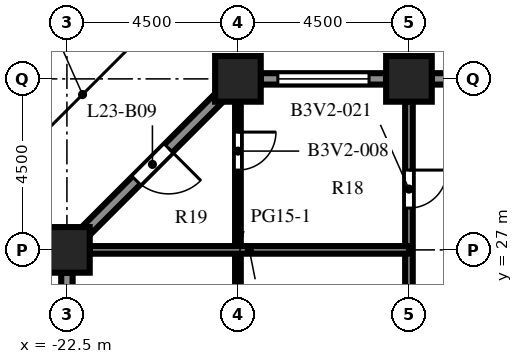
"""IFC4 building model, lengths in metres.
Left out: names, types, materials, properties, quantities, classifications, styles, units other than length and angle.
Written with IfcOpenShell. Run it as: python <this file> out.ifc"""

import sys

from ifc_helpers import new_model, si_unit, direction, frame, frame_2d, origin, origin_2d, place, context, subcontext, project, spatial, rectangle, extrude, element, fill, save


model = new_model("IFC4")
c1 = context("Model", 3, precision=1e-05, world=origin(), true_north=direction((0.0, 1.0)))
c2 = subcontext(c1, "Body", "Model", "MODEL_VIEW")
j1 = project(units=[si_unit("LENGTHUNIT", "METRE"), si_unit("PLANEANGLEUNIT", "RADIAN")], contexts=[c1])
p1 = place(None, origin())
s1 = spatial("IfcSite", under=j1, at=p1, CompositionType="ELEMENT")
p2 = place(p1, origin())
s2 = spatial("IfcBuilding", under=s1, at=p2, CompositionType="ELEMENT")
p3 = place(p2, frame((0.0, 0.0, 102.5)))
s3 = spatial("IfcBuildingStorey", under=s2, at=p3, CompositionType="ELEMENT", Elevation=102.5)
for number, where, z_axis, x_axis in (
    (1, (-22.5, 27.0, 0.0), (0.0, 0.0, 1.0), (1.0, 0.0, 0.0)),
    (2, (-18.0, 31.5, 0.0), (0.0, 0.0, 1.0), (1.0, 0.0, 0.0)),
    (3, (-13.5, 31.5, 0.0), (0.0, 0.0, 1.0), (1.0, 0.0, 0.0)),
):
    element("IfcColumn", number, at=place(p3, frame(where, z_axis=z_axis, x_axis=x_axis)), inside=s3, PredefinedType="COLUMN", context=c2, shape_type="SweptSolid", body=[
        extrude(rectangle(XDim=1.2, YDim=1.2, at=origin_2d()), origin(), (0.0, 0.0, 1.0), 4.1),
    ])
p4 = place(p3, frame((-12.9, 31.5, 0.0), z_axis=(0.0, 0.0, 1.0), x_axis=(1.0, 0.0, 0.0)))
e4 = element("IfcWall", 4, at=p4, inside=s3, PredefinedType="SOLIDWALL", context=c2, shape_type="SweptSolid", body=[
    extrude(rectangle(XDim=3.3, YDim=0.3, at=frame_2d((1.65, 0.0))), origin(), (0.0, 0.0, 1.0), 2.75),
])
p5 = place(p4, frame((1.15, 0.0, 0.0)))
e5 = element("IfcOpeningElement", 5, at=p5, cuts=e4, PredefinedType="OPENING", context=c2, shape_type="SweptSolid", body=[
    extrude(rectangle(XDim=1.0, YDim=2.2, at=frame_2d((0.5, 1.1))), frame((0.0, 0.16, 0.0), z_axis=(0.0, -1.0, 0.0), x_axis=(1.0, 0.0, 0.0)), (0.0, 0.0, 1.0), 0.32),
])
p6 = place(p3, frame((-17.4, 31.5, 0.0), z_axis=(0.0, 0.0, 1.0), x_axis=(1.0, 0.0, 0.0)))
e6 = element("IfcWall", 6, at=p6, inside=s3, PredefinedType="SOLIDWALL", context=c2, shape_type="SweptSolid", body=[
    extrude(rectangle(XDim=3.3, YDim=0.3, at=frame_2d((1.65, 0.0))), origin(), (0.0, 0.0, 1.0), 2.75),
])
p7 = place(p6, frame((0.45, 0.0, 0.8)))
e7 = element("IfcOpeningElement", 7, at=p7, cuts=e6, PredefinedType="OPENING", context=c2, shape_type="SweptSolid", body=[
    extrude(rectangle(XDim=2.4, YDim=1.7, at=frame_2d((1.2, 0.85))), frame((0.0, 0.16, 0.0), z_axis=(0.0, -1.0, 0.0), x_axis=(1.0, 0.0, 0.0)), (0.0, 0.0, 1.0), 0.32),
])
p8 = place(p3, frame((-22.006, 27.494, 0.0), z_axis=(0.0, 0.0, 1.0), x_axis=(0.707106781187, 0.707106781187, 0.0)))
e8 = element("IfcWall", 8, at=p8, inside=s3, PredefinedType="SOLIDWALL", context=c2, shape_type="SweptSolid", body=[
    extrude(rectangle(XDim=4.967, YDim=0.3, at=frame_2d((2.483, 0.0))), origin(), (0.0, 0.0, 1.0), 2.75),
])
p9 = place(p8, frame((1.884, 0.0, 0.0)))
e9 = element("IfcOpeningElement", 9, at=p9, cuts=e8, PredefinedType="OPENING", context=c2, shape_type="SweptSolid", body=[
    extrude(rectangle(XDim=1.2, YDim=2.2, at=frame_2d((0.6, 1.1))), frame((0.0, 0.16, 0.0), z_axis=(0.0, -1.0, 0.0), x_axis=(1.0, 0.0, 0.0)), (0.0, 0.0, 1.0), 0.32),
])
p10 = place(p3, frame((-22.5, 23.1, 0.0), z_axis=(0.0, 0.0, 1.0), x_axis=(0.0, 1.0, 0.0)))
e10 = element("IfcWall", 10, at=p10, inside=s3, PredefinedType="SOLIDWALL", context=c2, shape_type="SweptSolid", body=[
    extrude(rectangle(XDim=3.3, YDim=0.3, at=frame_2d((1.65, 0.0))), origin(), (0.0, 0.0, 1.0), 2.75),
])
p11 = place(p10, frame((0.45, 0.0, 0.8)))
e11 = element("IfcOpeningElement", 11, at=p11, cuts=e10, PredefinedType="OPENING", context=c2, shape_type="SweptSolid", body=[
    extrude(rectangle(XDim=2.4, YDim=1.7, at=frame_2d((1.2, 0.85))), frame((0.0, 0.16, 0.0), z_axis=(0.0, -1.0, 0.0), x_axis=(1.0, 0.0, 0.0)), (0.0, 0.0, 1.0), 0.32),
])
p12 = place(p3, frame((-18.0, 23.2, 0.0), z_axis=(0.0, 0.0, 1.0), x_axis=(0.0, 1.0, 0.0)))
e12 = element("IfcWall", 12, at=p12, inside=s3, PredefinedType="PARTITIONING", context=c2, shape_type="SweptSolid", body=[
    extrude(rectangle(XDim=7.7, YDim=0.15, at=frame_2d((3.85, 0.0))), origin(), (0.0, 0.0, 1.0), 3.65),
])
p13 = place(p12, frame((0.15, 0.0, 0.0)))
e13 = element("IfcOpeningElement", 13, at=p13, cuts=e12, PredefinedType="OPENING", context=c2, shape_type="SweptSolid", body=[
    extrude(rectangle(XDim=1.0, YDim=2.1, at=frame_2d((0.5, 1.05))), frame((0.0, 0.085, 0.0), z_axis=(0.0, -1.0, 0.0), x_axis=(1.0, 0.0, 0.0)), (0.0, 0.0, 1.0), 0.17),
])
p14 = place(p12, frame((5.9, 0.0, 0.0)))
e14 = element("IfcOpeningElement", 14, at=p14, cuts=e12, PredefinedType="OPENING", context=c2, shape_type="SweptSolid", body=[
    extrude(rectangle(XDim=1.0, YDim=2.1, at=frame_2d((0.5, 1.05))), frame((0.0, 0.085, 0.0), z_axis=(0.0, -1.0, 0.0), x_axis=(1.0, 0.0, 0.0)), (0.0, 0.0, 1.0), 0.17),
])
p15 = place(p3, frame((-13.5, -21.9, 0.0), z_axis=(0.0, 0.0, 1.0), x_axis=(0.0, 1.0, 0.0)))
e15 = element("IfcWall", 15, at=p15, inside=s3, PredefinedType="PARTITIONING", context=c2, shape_type="SweptSolid", body=[
    extrude(rectangle(XDim=52.8, YDim=0.2, at=frame_2d((26.4, 0.0))), origin(), (0.0, 0.0, 1.0), 3.65),
])
p16 = place(p15, frame((0.75, 0.0, 0.0)))
e16 = element("IfcOpeningElement", 16, at=p16, cuts=e15, PredefinedType="OPENING", context=c2, shape_type="SweptSolid", body=[
    extrude(rectangle(XDim=1.0, YDim=2.1, at=frame_2d((0.5, 1.05))), frame((0.0, 0.11, 0.0), z_axis=(0.0, -1.0, 0.0), x_axis=(1.0, 0.0, 0.0)), (0.0, 0.0, 1.0), 0.22),
])
p17 = place(p15, frame((5.0, 0.0, 0.0)))
e17 = element("IfcOpeningElement", 17, at=p17, cuts=e15, PredefinedType="OPENING", context=c2, shape_type="SweptSolid", body=[
    extrude(rectangle(XDim=1.0, YDim=2.1, at=frame_2d((0.5, 1.05))), frame((0.0, 0.11, 0.0), z_axis=(0.0, -1.0, 0.0), x_axis=(1.0, 0.0, 0.0)), (0.0, 0.0, 1.0), 0.22),
])
p18 = place(p15, frame((12.5, 0.0, 0.0)))
e18 = element("IfcOpeningElement", 18, at=p18, cuts=e15, PredefinedType="OPENING", context=c2, shape_type="SweptSolid", body=[
    extrude(rectangle(XDim=1.0, YDim=2.1, at=frame_2d((0.5, 1.05))), frame((0.0, 0.11, 0.0), z_axis=(0.0, -1.0, 0.0), x_axis=(1.0, 0.0, 0.0)), (0.0, 0.0, 1.0), 0.22),
])
p19 = place(p15, frame((19.75, 0.0, 0.0)))
e19 = element("IfcOpeningElement", 19, at=p19, cuts=e15, PredefinedType="OPENING", context=c2, shape_type="SweptSolid", body=[
    extrude(rectangle(XDim=1.0, YDim=2.1, at=frame_2d((0.5, 1.05))), frame((0.0, 0.11, 0.0), z_axis=(0.0, -1.0, 0.0), x_axis=(1.0, 0.0, 0.0)), (0.0, 0.0, 1.0), 0.22),
])
p20 = place(p15, frame((26.0, 0.0, 0.0)))
e20 = element("IfcOpeningElement", 20, at=p20, cuts=e15, PredefinedType="OPENING", context=c2, shape_type="SweptSolid", body=[
    extrude(rectangle(XDim=1.0, YDim=2.1, at=frame_2d((0.5, 1.05))), frame((0.0, 0.11, 0.0), z_axis=(0.0, -1.0, 0.0), x_axis=(1.0, 0.0, 0.0)), (0.0, 0.0, 1.0), 0.22),
])
p21 = place(p15, frame((37.5, 0.0, 0.0)))
e21 = element("IfcOpeningElement", 21, at=p21, cuts=e15, PredefinedType="OPENING", context=c2, shape_type="SweptSolid", body=[
    extrude(rectangle(XDim=1.0, YDim=2.1, at=frame_2d((0.5, 1.05))), frame((0.0, 0.11, 0.0), z_axis=(0.0, -1.0, 0.0), x_axis=(1.0, 0.0, 0.0)), (0.0, 0.0, 1.0), 0.22),
])
p22 = place(p15, frame((43.25, 0.0, 0.0)))
e22 = element("IfcOpeningElement", 22, at=p22, cuts=e15, PredefinedType="OPENING", context=c2, shape_type="SweptSolid", body=[
    extrude(rectangle(XDim=1.0, YDim=2.1, at=frame_2d((0.5, 1.05))), frame((0.0, 0.11, 0.0), z_axis=(0.0, -1.0, 0.0), x_axis=(1.0, 0.0, 0.0)), (0.0, 0.0, 1.0), 0.22),
])
p23 = place(p15, frame((50.0, 0.0, 0.0)))
e23 = element("IfcOpeningElement", 23, at=p23, cuts=e15, PredefinedType="OPENING", context=c2, shape_type="SweptSolid", body=[
    extrude(rectangle(XDim=1.0, YDim=2.1, at=frame_2d((0.5, 1.05))), frame((0.0, 0.11, 0.0), z_axis=(0.0, -1.0, 0.0), x_axis=(1.0, 0.0, 0.0)), (0.0, 0.0, 1.0), 0.22),
])
p24 = place(p3, frame((-21.9, 27.0, 0.0), z_axis=(0.0, 0.0, 1.0), x_axis=(1.0, 0.0, 0.0)))
e24 = element("IfcWall", 24, at=p24, inside=s3, PredefinedType="PARTITIONING", context=c2, shape_type="SweptSolid", body=[
    extrude(rectangle(XDim=8.4, YDim=0.2, at=frame_2d((4.2, 0.0))), origin(), (0.0, 0.0, 1.0), 3.65),
])
p25 = place(p7, origin())
e25 = element("IfcWindow", 25, at=p25, inside=s3, PartitioningType="SINGLE_PANEL", PredefinedType="WINDOW", context=c2, shape_type="SweptSolid", body=[
    extrude(rectangle(XDim=2.4, YDim=1.7, at=frame_2d((1.2, 0.85))), frame((0.0, 0.03, 0.0), z_axis=(0.0, -1.0, 0.0), x_axis=(1.0, 0.0, 0.0)), (0.0, 0.0, 1.0), 0.06),
])
fill(e7, e25)
p26 = place(p9, origin())
e26 = element("IfcDoor", 26, at=p26, inside=s3, OperationType="SINGLE_SWING_RIGHT", PredefinedType="DOOR", context=c2, shape_type="SweptSolid", body=[
    extrude(rectangle(XDim=1.2, YDim=2.2, at=frame_2d((0.6, 1.1))), frame((0.0, 0.025, 0.0), z_axis=(0.0, -1.0, 0.0), x_axis=(1.0, 0.0, 0.0)), (0.0, 0.0, 1.0), 0.05),
])
fill(e9, e26)
p27 = place(p14, origin())
e27 = element("IfcDoor", 27, at=p27, inside=s3, OperationType="SINGLE_SWING_RIGHT", PredefinedType="DOOR", context=c2, shape_type="SweptSolid", body=[
    extrude(rectangle(XDim=1.0, YDim=2.1, at=frame_2d((0.5, 1.05))), frame((0.0, 0.025, 0.0), z_axis=(0.0, -1.0, 0.0), x_axis=(1.0, 0.0, 0.0)), (0.0, 0.0, 1.0), 0.05),
])
fill(e14, e27)
p28 = place(p23, origin())
e28 = element("IfcDoor", 28, at=p28, inside=s3, OperationType="SINGLE_SWING_RIGHT", PredefinedType="DOOR", context=c2, shape_type="SweptSolid", body=[
    extrude(rectangle(XDim=1.0, YDim=2.1, at=frame_2d((0.5, 1.05))), frame((0.0, 0.025, 0.0), z_axis=(0.0, -1.0, 0.0), x_axis=(1.0, 0.0, 0.0)), (0.0, 0.0, 1.0), 0.05),
])
fill(e23, e28)
save(model, sys.argv[1])
